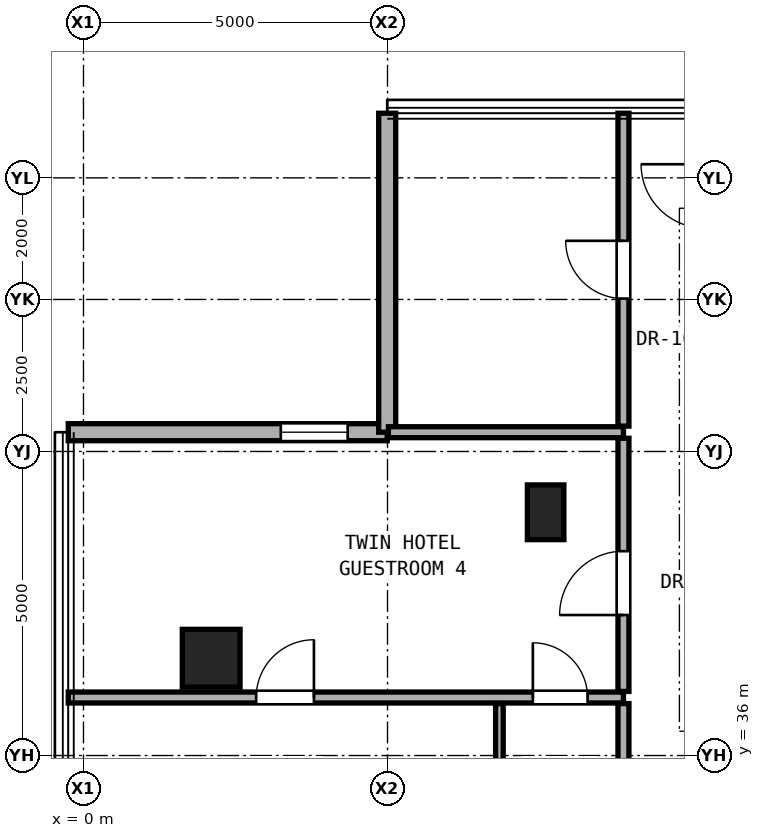
"""IFC4 building model, lengths in metres.
Left out: names, types, materials, properties, quantities, classifications, styles, units other than length and angle.
Written with IfcOpenShell. Run it as: python <this file> out.ifc"""

import sys

from ifc_helpers import new_model, si_unit, direction, frame, frame_2d, origin, origin_2d, place, context, subcontext, project, spatial, rectangle, hollow_rectangle, extrude, element, fill, save


model = new_model("IFC4")
c1 = context("Model", 3, precision=1e-05, world=origin(), true_north=direction((0.0, 1.0)))
c2 = subcontext(c1, "Body", "Model", "MODEL_VIEW")
j1 = project(units=[si_unit("LENGTHUNIT", "METRE"), si_unit("PLANEANGLEUNIT", "RADIAN")], contexts=[c1])
p1 = place(None, origin())
s1 = spatial("IfcSite", under=j1, at=p1, CompositionType="ELEMENT")
p2 = place(p1, origin())
s2 = spatial("IfcBuilding", under=s1, at=p2, CompositionType="ELEMENT")
p3 = place(p2, frame((0.0, 0.0, 167.4)))
s3 = spatial("IfcBuildingStorey", under=s2, at=p3, CompositionType="ELEMENT", Elevation=167.4)
p4 = place(p3, frame((2.1, 37.6, 0.0), z_axis=(0.0, 0.0, 1.0), x_axis=(1.0, 0.0, 0.0)))
e1 = element("IfcColumn", 1, at=p4, inside=s3, PredefinedType="COLUMN", context=c2, shape_type="SweptSolid", body=[
    extrude(hollow_rectangle(XDim=0.95, YDim=0.95, WallThickness=0.05, at=origin_2d()), origin(), (0.0, 0.0, 1.0), 3.25),
])
p5 = place(p3, frame((7.6, 40.0, 0.0), z_axis=(0.0, 0.0, 1.0), x_axis=(1.0, 0.0, 0.0)))
e2 = element("IfcColumn", 2, at=p5, inside=s3, PredefinedType="PILASTER", context=c2, shape_type="SweptSolid", body=[
    extrude(rectangle(XDim=0.6, YDim=0.9, at=origin_2d()), origin(), (0.0, 0.0, 1.0), 3.25),
])
p6 = place(p3, frame((4.995, 41.317, 0.0), z_axis=(0.0, 0.0, 1.0), x_axis=(-1.0, 0.0, 0.0)))
e3 = element("IfcWall", 3, at=p6, inside=s3, PredefinedType="SOLIDWALL", context=c2, shape_type="SweptSolid", body=[
    extrude(rectangle(XDim=5.245, YDim=0.28, at=frame_2d((2.623, 0.0))), origin(), (0.0, 0.0, 1.0), 3.03),
])
p7 = place(p6, frame((0.65, 0.0, 0.85)))
e4 = element("IfcOpeningElement", 4, at=p7, cuts=e3, PredefinedType="OPENING", context=c2, shape_type="SweptSolid", body=[
    extrude(rectangle(XDim=1.1, YDim=2.0, at=frame_2d((0.55, 1.0))), frame((0.0, 0.15, 0.0), z_axis=(0.0, -1.0, 0.0), x_axis=(1.0, 0.0, 0.0)), (0.0, 0.0, 1.0), 0.3),
])
p8 = place(p3, frame((4.995, 46.562, 0.0), z_axis=(0.0, 0.0, 1.0), x_axis=(0.0, -1.0, 0.0)))
e5 = element("IfcWall", 5, at=p8, inside=s3, PredefinedType="SOLIDWALL", context=c2, shape_type="SweptSolid", body=[
    extrude(rectangle(XDim=5.245, YDim=0.28, at=frame_2d((2.623, 0.0))), origin(), (0.0, 0.0, 1.0), 3.03),
])
p9 = place(p3, frame((-0.25, 36.954, 0.0), z_axis=(0.0, 0.0, 1.0), x_axis=(1.0, 0.0, 0.0)))
e6 = element("IfcWall", 6, at=p9, inside=s3, PredefinedType="PARTITIONING", context=c2, shape_type="SweptSolid", body=[
    extrude(rectangle(XDim=9.13, YDim=0.18, at=frame_2d((4.565, 0.0))), origin(), (0.0, 0.0, 1.0), 2.269),
])
p10 = place(p9, frame((3.09, 0.0, 0.0)))
e7 = element("IfcOpeningElement", 7, at=p10, cuts=e6, PredefinedType="OPENING", context=c2, shape_type="SweptSolid", body=[
    extrude(rectangle(XDim=0.95, YDim=2.15, at=frame_2d((0.475, 1.075))), frame((0.0, 0.1, 0.0), z_axis=(0.0, -1.0, 0.0), x_axis=(1.0, 0.0, 0.0)), (0.0, 0.0, 1.0), 0.2),
])
p11 = place(p9, frame((7.64, 0.0, 0.0)))
e8 = element("IfcOpeningElement", 8, at=p11, cuts=e6, PredefinedType="OPENING", context=c2, shape_type="SweptSolid", body=[
    extrude(rectangle(XDim=0.9, YDim=2.1, at=frame_2d((0.45, 1.05))), frame((0.0, 0.1, 0.0), z_axis=(0.0, -1.0, 0.0), x_axis=(1.0, 0.0, 0.0)), (0.0, 0.0, 1.0), 0.2),
])
p12 = place(p3, frame((5.015, 41.317, 0.0), z_axis=(0.0, 0.0, 1.0), x_axis=(1.0, 0.0, 0.0)))
e9 = element("IfcWall", 9, at=p12, inside=s3, PredefinedType="PARTITIONING", context=c2, shape_type="SweptSolid", body=[
    extrude(rectangle(XDim=3.865, YDim=0.18, at=frame_2d((1.933, 0.0))), origin(), (0.0, 0.0, 1.0), 3.05),
])
p13 = place(p3, frame((6.84, 34.334, 0.0), z_axis=(0.0, 0.0, 1.0), x_axis=(0.0, 1.0, 0.0)))
e10 = element("IfcWall", 10, at=p13, inside=s3, PredefinedType="PARTITIONING", context=c2, shape_type="SweptSolid", body=[
    extrude(rectangle(XDim=2.52, YDim=0.125, at=frame_2d((1.26, 0.0))), origin(), (0.0, 0.0, 1.0), 3.05),
])
p14 = place(p3, frame((8.88, 34.334, 0.0), z_axis=(0.0, 0.0, 1.0), x_axis=(0.0, 1.0, 0.0)))
e11 = element("IfcWall", 11, at=p14, inside=s3, PredefinedType="PARTITIONING", context=c2, shape_type="SweptSolid", body=[
    extrude(rectangle(XDim=2.52, YDim=0.18, at=frame_2d((1.26, 0.0))), origin(), (0.0, 0.0, 1.0), 3.05),
])
p15 = place(p3, frame((8.88, 37.054, 0.0), z_axis=(0.0, 0.0, 1.0), x_axis=(0.0, 1.0, 0.0)))
e12 = element("IfcWall", 12, at=p15, inside=s3, PredefinedType="PARTITIONING", context=c2, shape_type="SweptSolid", body=[
    extrude(rectangle(XDim=4.163, YDim=0.18, at=frame_2d((2.082, 0.0))), origin(), (0.0, 0.0, 1.0), 2.442),
])
p16 = place(p15, frame((1.257, 0.0, 0.0)))
e13 = element("IfcOpeningElement", 13, at=p16, cuts=e12, PredefinedType="OPENING", context=c2, shape_type="SweptSolid", body=[
    extrude(rectangle(XDim=1.05, YDim=2.2, at=frame_2d((0.525, 1.1))), frame((0.0, 0.1, 0.0), z_axis=(0.0, -1.0, 0.0), x_axis=(1.0, 0.0, 0.0)), (0.0, 0.0, 1.0), 0.2),
])
p17 = place(p3, frame((8.88, 41.417, 0.0), z_axis=(0.0, 0.0, 1.0), x_axis=(0.0, 1.0, 0.0)))
e14 = element("IfcWall", 14, at=p17, inside=s3, PredefinedType="PARTITIONING", context=c2, shape_type="SweptSolid", body=[
    extrude(rectangle(XDim=5.145, YDim=0.18, at=frame_2d((2.573, 0.0))), origin(), (0.0, 0.0, 1.0), 3.05),
])
p18 = place(p17, frame((2.097, 0.0, 0.0)))
e15 = element("IfcOpeningElement", 15, at=p18, cuts=e14, PredefinedType="OPENING", context=c2, shape_type="SweptSolid", body=[
    extrude(rectangle(XDim=0.95, YDim=2.15, at=frame_2d((0.475, 1.075))), frame((0.0, 0.1, 0.0), z_axis=(0.0, -1.0, 0.0), x_axis=(1.0, 0.0, 0.0)), (0.0, 0.0, 1.0), 0.2),
])
p19 = place(p7, origin())
e16 = element("IfcWindow", 16, at=p19, inside=s3, PartitioningType="SINGLE_PANEL", PredefinedType="WINDOW", context=c2, shape_type="SweptSolid", body=[
    extrude(rectangle(XDim=1.1, YDim=2.0, at=frame_2d((0.55, 1.0))), frame((0.0, 0.03, 0.0), z_axis=(0.0, -1.0, 0.0), x_axis=(1.0, 0.0, 0.0)), (0.0, 0.0, 1.0), 0.06),
])
fill(e4, e16)
p20 = place(p16, origin())
e17 = element("IfcDoor", 17, at=p20, inside=s3, OperationType="SINGLE_SWING_LEFT", PredefinedType="DOOR", context=c2, shape_type="SweptSolid", body=[
    extrude(rectangle(XDim=1.05, YDim=2.2, at=frame_2d((0.525, 1.1))), frame((0.0, 0.025, 0.0), z_axis=(0.0, -1.0, 0.0), x_axis=(1.0, 0.0, 0.0)), (0.0, 0.0, 1.0), 0.05),
])
fill(e13, e17)
p21 = place(p10, origin())
e18 = element("IfcDoor", 18, at=p21, inside=s3, OperationType="SINGLE_SWING_RIGHT", PredefinedType="DOOR", context=c2, shape_type="SweptSolid", body=[
    extrude(rectangle(XDim=0.95, YDim=2.15, at=frame_2d((0.475, 1.075))), frame((0.0, 0.025, 0.0), z_axis=(0.0, -1.0, 0.0), x_axis=(1.0, 0.0, 0.0)), (0.0, 0.0, 1.0), 0.05),
])
fill(e7, e18)
p22 = place(p11, origin())
e19 = element("IfcDoor", 19, at=p22, inside=s3, OperationType="SINGLE_SWING_LEFT", PredefinedType="DOOR", context=c2, shape_type="SweptSolid", body=[
    extrude(rectangle(XDim=0.9, YDim=2.1, at=frame_2d((0.45, 1.05))), frame((0.0, 0.025, 0.0), z_axis=(0.0, -1.0, 0.0), x_axis=(1.0, 0.0, 0.0)), (0.0, 0.0, 1.0), 0.05),
])
fill(e8, e19)
p23 = place(p18, origin())
e20 = element("IfcDoor", 20, at=p23, inside=s3, OperationType="SINGLE_SWING_RIGHT", PredefinedType="DOOR", context=c2, shape_type="SweptSolid", body=[
    extrude(rectangle(XDim=0.95, YDim=2.15, at=frame_2d((0.475, 1.075))), frame((0.0, 0.025, 0.0), z_axis=(0.0, -1.0, 0.0), x_axis=(1.0, 0.0, 0.0)), (0.0, 0.0, 1.0), 0.05),
])
fill(e15, e20)
save(model, sys.argv[1])
